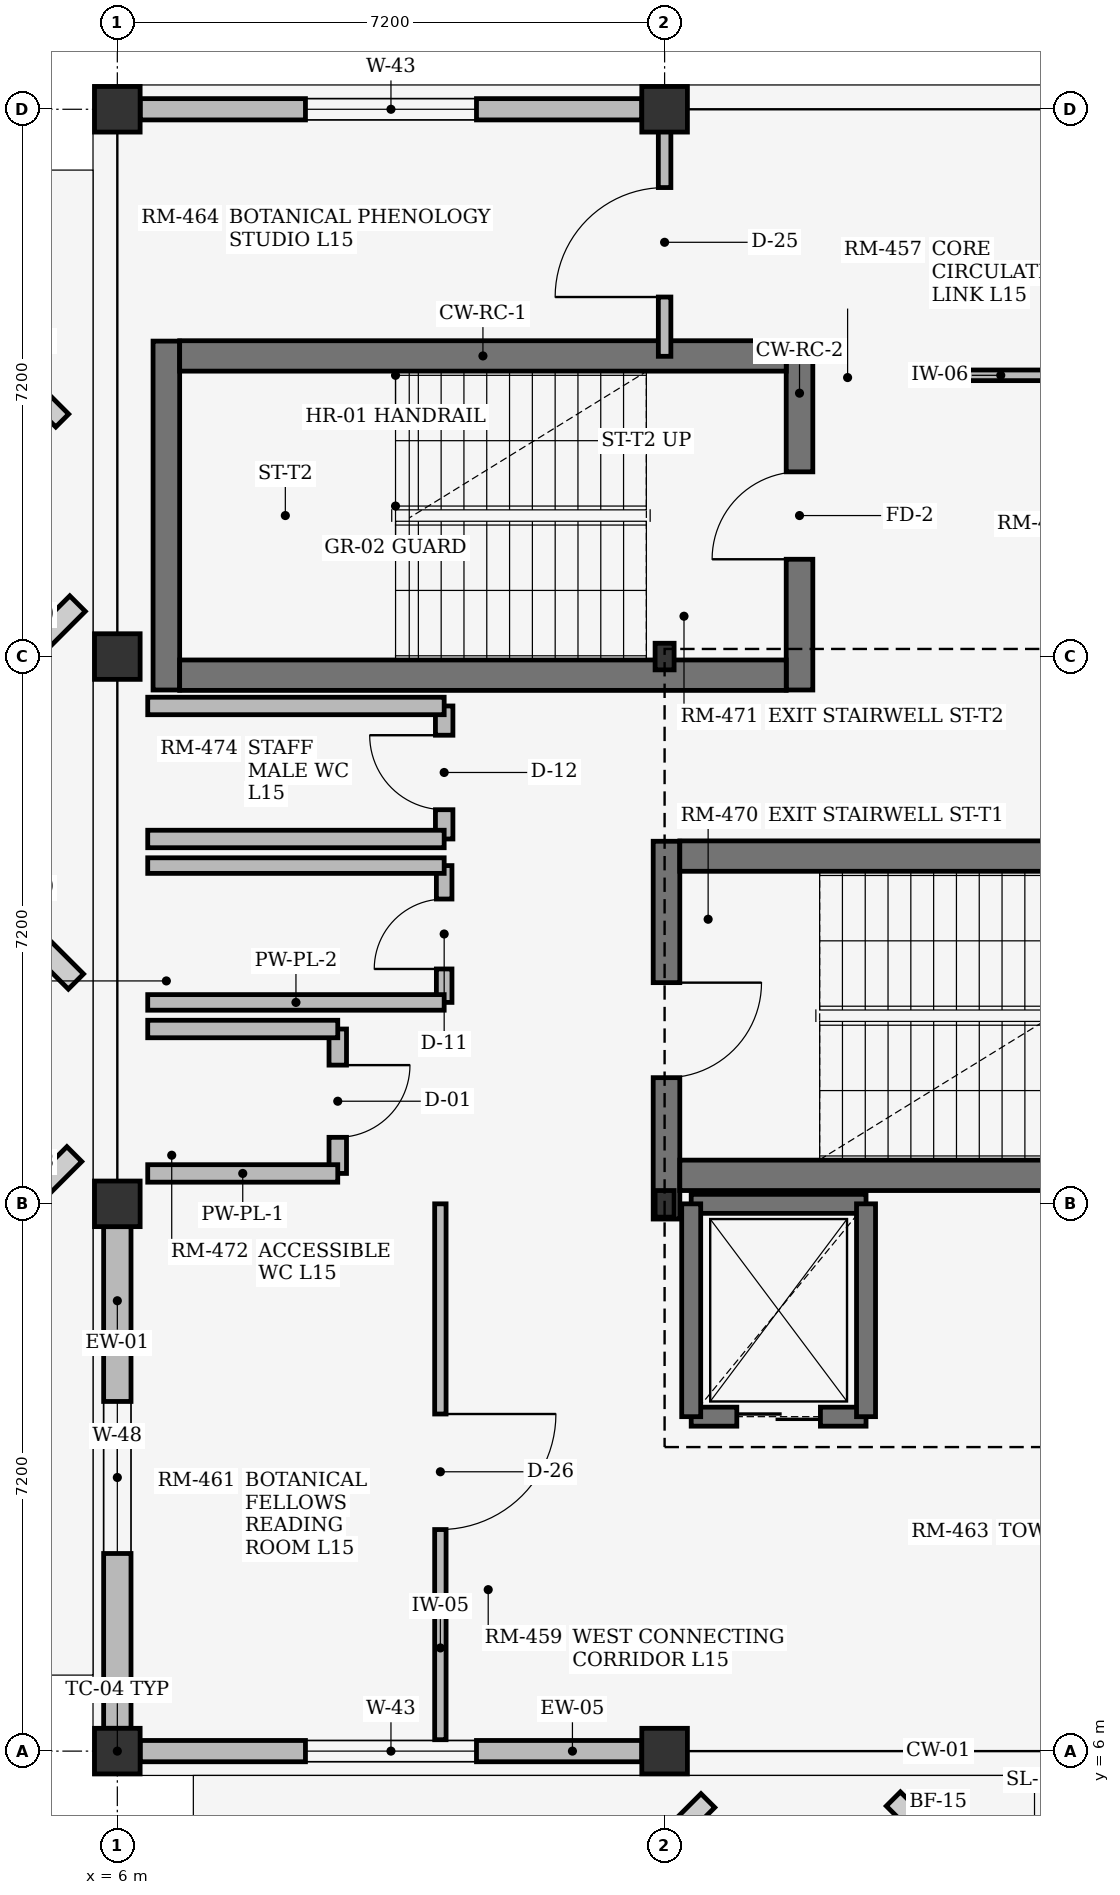
"""IFC4 building model, lengths in metres.
Left out: names, types, materials, properties, quantities, classifications, styles, units other than length and angle.
Written with IfcOpenShell. Run it as: python <this file> out.ifc"""

import sys

from ifc_helpers import new_model, si_unit, direction, frame, frame_2d, origin, origin_2d, place, context, subcontext, project, spatial, rectangle, i_section, extrude, element, fill, save


model = new_model("IFC4")
c1 = context("Model", 3, precision=1e-05, world=origin(), true_north=direction((0.0, 1.0)))
c2 = subcontext(c1, "Body", "Model", "MODEL_VIEW")
j1 = project(units=[si_unit("LENGTHUNIT", "METRE"), si_unit("PLANEANGLEUNIT", "RADIAN")], contexts=[c1])
p1 = place(None, origin())
s1 = spatial("IfcSite", under=j1, at=p1, CompositionType="ELEMENT")
p2 = place(p1, origin())
s2 = spatial("IfcBuilding", under=s1, at=p2, CompositionType="ELEMENT")
p3 = place(p2, frame((0.0, 0.0, 59.4)))
s3 = spatial("IfcBuildingStorey", under=s2, at=p3, CompositionType="ELEMENT", Elevation=59.4)
for number, where, z_axis, x_axis in (
    (1, (6.0, 6.0, 0.0), (0.0, 0.0, 1.0), (1.0, 0.0, 0.0)),
    (2, (6.0, 13.2, 0.0), (0.0, 0.0, 1.0), (1.0, 0.0, 0.0)),
    (3, (6.0, 20.4, 0.0), (0.0, 0.0, 1.0), (1.0, 0.0, 0.0)),
    (4, (6.0, 27.6, 0.0), (0.0, 0.0, 1.0), (1.0, 0.0, 0.0)),
    (5, (13.2, 6.0, 0.0), (0.0, 0.0, 1.0), (1.0, 0.0, 0.0)),
):
    element("IfcColumn", number, at=place(p3, frame(where, z_axis=z_axis, x_axis=x_axis)), inside=s3, PredefinedType="COLUMN", context=c2, shape_type="SweptSolid", body=[
        extrude(rectangle(XDim=0.6, YDim=0.6, at=origin_2d()), origin(), (0.0, 0.0, 1.0), 3.53),
    ])
for number, where, z_axis, x_axis in (
    (6, (13.2, 13.2, 0.0), (0.0, 0.0, 1.0), (1.0, 0.0, 0.0)),
    (7, (13.2, 20.4, 0.0), (0.0, 0.0, 1.0), (1.0, 0.0, 0.0)),
):
    element("IfcColumn", number, at=place(p3, frame(where, z_axis=z_axis, x_axis=x_axis)), inside=s3, PredefinedType="COLUMN", context=c2, shape_type="SweptSolid", body=[
        extrude(i_section(OverallWidth=0.25, OverallDepth=0.35, WebThickness=0.01, FlangeThickness=0.012, at=origin_2d()), origin(), (0.0, 0.0, 1.0), 3.53),
    ])
p4 = place(p3, frame((13.2, 27.6, 0.0), z_axis=(0.0, 0.0, 1.0), x_axis=(1.0, 0.0, 0.0)))
e8 = element("IfcColumn", 8, at=p4, inside=s3, PredefinedType="COLUMN", context=c2, shape_type="SweptSolid", body=[
    extrude(rectangle(XDim=0.6, YDim=0.6, at=origin_2d()), origin(), (0.0, 0.0, 1.0), 3.53),
])
p5 = place(p3, frame((6.3, 6.0, 0.0), z_axis=(0.0, 0.0, 1.0), x_axis=(1.0, 0.0, 0.0)))
e9 = element("IfcWall", 9, at=p5, inside=s3, PredefinedType="STANDARD", context=c2, shape_type="SweptSolid", body=[
    extrude(rectangle(XDim=6.6, YDim=0.28, at=frame_2d((3.3, 0.0))), origin(), (0.0, 0.0, 1.0), 3.11),
])
p6 = place(p5, frame((2.175, 0.0, 0.75)))
e10 = element("IfcOpeningElement", 10, at=p6, cuts=e9, PredefinedType="OPENING", context=c2, shape_type="SweptSolid", body=[
    extrude(rectangle(XDim=2.25, YDim=1.5, at=frame_2d((1.125, 0.75))), frame((0.0, 0.15, 0.0), z_axis=(0.0, -1.0, 0.0), x_axis=(1.0, 0.0, 0.0)), (0.0, 0.0, 1.0), 0.3),
])
p7 = place(p3, frame((6.3, 27.6, 0.0), z_axis=(0.0, 0.0, 1.0), x_axis=(1.0, 0.0, 0.0)))
e11 = element("IfcWall", 11, at=p7, inside=s3, PredefinedType="STANDARD", context=c2, shape_type="SweptSolid", body=[
    extrude(rectangle(XDim=6.6, YDim=0.28, at=frame_2d((3.3, 0.0))), origin(), (0.0, 0.0, 1.0), 3.11),
])
p8 = place(p7, frame((2.175, 0.0, 0.75)))
e12 = element("IfcOpeningElement", 12, at=p8, cuts=e11, PredefinedType="OPENING", context=c2, shape_type="SweptSolid", body=[
    extrude(rectangle(XDim=2.25, YDim=1.5, at=frame_2d((1.125, 0.75))), frame((0.0, 0.15, 0.0), z_axis=(0.0, -1.0, 0.0), x_axis=(1.0, 0.0, 0.0)), (0.0, 0.0, 1.0), 0.3),
])
p9 = place(p3, frame((6.0, 6.3, 0.0), z_axis=(0.0, 0.0, 1.0), x_axis=(0.0, 1.0, 0.0)))
e13 = element("IfcWall", 13, at=p9, inside=s3, PredefinedType="STANDARD", context=c2, shape_type="SweptSolid", body=[
    extrude(rectangle(XDim=6.6, YDim=0.36, at=frame_2d((3.3, 0.0))), origin(), (0.0, 0.0, 1.0), 3.11),
])
p10 = place(p9, frame((2.3, 0.0, 0.75)))
e14 = element("IfcOpeningElement", 14, at=p10, cuts=e13, PredefinedType="OPENING", context=c2, shape_type="SweptSolid", body=[
    extrude(rectangle(XDim=2.0, YDim=1.25, at=frame_2d((1.0, 0.625))), frame((0.0, 0.19, 0.0), z_axis=(0.0, -1.0, 0.0), x_axis=(1.0, 0.0, 0.0)), (0.0, 0.0, 1.0), 0.38),
])
p11 = place(p3, frame((13.225, 13.0, 0.0), z_axis=(0.0, 0.0, 1.0), x_axis=(0.0, 1.0, 0.0)))
e15 = element("IfcWall", 15, at=p11, inside=s3, PredefinedType="SHEAR", context=c2, shape_type="SweptSolid", body=[
    extrude(rectangle(XDim=4.97, YDim=0.35, at=frame_2d((2.485, 0.0))), origin(), (0.0, 0.0, 1.0), 3.53),
])
p12 = place(p11, frame((1.86, 0.0, 0.0)))
e16 = element("IfcOpeningElement", 16, at=p12, cuts=e15, PredefinedType="OPENING", context=c2, shape_type="SweptSolid", body=[
    extrude(rectangle(XDim=1.25, YDim=2.2, at=frame_2d((0.625, 1.1))), frame((0.0, 0.185, 0.0), z_axis=(0.0, -1.0, 0.0), x_axis=(1.0, 0.0, 0.0)), (0.0, 0.0, 1.0), 0.37),
])
for number, where, z_axis, x_axis in (
    (17, (13.4, 13.575, 0.0), (0.0, 0.0, 1.0), (1.0, 0.0, 0.0)),
    (18, (13.4, 17.775, 0.0), (0.0, 0.0, 1.0), (1.0, 0.0, 0.0)),
):
    element("IfcWall", number, at=place(p3, frame(where, z_axis=z_axis, x_axis=x_axis)), inside=s3, PredefinedType="SHEAR", context=c2, shape_type="SweptSolid", body=[
        extrude(rectangle(XDim=7.98, YDim=0.4, at=frame_2d((3.99, 0.0))), origin(), (0.0, 0.0, 1.0), 3.53),
    ])
p13 = place(p3, frame((14.975, 24.55, 0.0), z_axis=(0.0, 0.0, 1.0), x_axis=(0.0, -1.0, 0.0)))
e19 = element("IfcWall", 19, at=p13, inside=s3, PredefinedType="SHEAR", context=c2, shape_type="SweptSolid", body=[
    extrude(rectangle(XDim=4.59, YDim=0.35, at=frame_2d((2.295, 0.0))), origin(), (0.0, 0.0, 1.0), 3.53),
])
p14 = place(p13, frame((1.72, 0.0, 0.0)))
e20 = element("IfcOpeningElement", 20, at=p14, cuts=e19, PredefinedType="OPENING", context=c2, shape_type="SweptSolid", body=[
    extrude(rectangle(XDim=1.15, YDim=2.2, at=frame_2d((0.575, 1.1))), frame((0.0, 0.185, 0.0), z_axis=(0.0, -1.0, 0.0), x_axis=(1.0, 0.0, 0.0)), (0.0, 0.0, 1.0), 0.37),
])
p15 = place(p3, frame((6.645, 24.55, 0.0), z_axis=(0.0, 0.0, 1.0), x_axis=(0.0, -1.0, 0.0)))
e21 = element("IfcWall", 21, at=p15, inside=s3, PredefinedType="SHEAR", context=c2, shape_type="SweptSolid", body=[
    extrude(rectangle(XDim=4.59, YDim=0.35, at=frame_2d((2.295, 0.0))), origin(), (0.0, 0.0, 1.0), 3.53),
])
for number, where, z_axis, x_axis in (
    (22, (14.8, 24.355, 0.0), (0.0, 0.0, 1.0), (-1.0, 0.0, 0.0)),
    (23, (14.8, 20.155, 0.0), (0.0, 0.0, 1.0), (-1.0, 0.0, 0.0)),
):
    element("IfcWall", number, at=place(p3, frame(where, z_axis=z_axis, x_axis=x_axis)), inside=s3, PredefinedType="SHEAR", context=c2, shape_type="SweptSolid", body=[
        extrude(rectangle(XDim=7.98, YDim=0.4, at=frame_2d((3.99, 0.0))), origin(), (0.0, 0.0, 1.0), 3.53),
    ])
p16 = place(p3, frame((13.55, 10.4, 0.0), z_axis=(0.0, 0.0, 1.0), x_axis=(1.0, 0.0, 0.0)))
e24 = element("IfcWall", 24, at=p16, inside=s3, PredefinedType="SHEAR", context=c2, shape_type="SweptSolid", body=[
    extrude(rectangle(XDim=2.3, YDim=0.25, at=frame_2d((1.15, 0.0))), origin(), (0.0, 0.0, 1.0), 3.53),
])
p17 = place(p16, frame((0.6, 0.0, 0.0)))
e25 = element("IfcOpeningElement", 25, at=p17, cuts=e24, PredefinedType="OPENING", context=c2, shape_type="SweptSolid", body=[
    extrude(rectangle(XDim=1.1, YDim=2.2, at=frame_2d((0.55, 1.1))), frame((0.0, 0.135, 0.0), z_axis=(0.0, -1.0, 0.0), x_axis=(1.0, 0.0, 0.0)), (0.0, 0.0, 1.0), 0.27),
])
p18 = place(p3, frame((13.55, 13.2, 0.0), z_axis=(0.0, 0.0, 1.0), x_axis=(1.0, 0.0, 0.0)))
e26 = element("IfcWall", 26, at=p18, inside=s3, PredefinedType="SHEAR", context=c2, shape_type="SweptSolid", body=[
    extrude(rectangle(XDim=2.3, YDim=0.25, at=frame_2d((1.15, 0.0))), origin(), (0.0, 0.0, 1.0), 3.53),
])
for number, where, z_axis, x_axis in (
    (27, (13.55, 10.4, 0.0), (0.0, 0.0, 1.0), (0.0, 1.0, 0.0)),
    (28, (15.85, 10.4, 0.0), (0.0, 0.0, 1.0), (0.0, 1.0, 0.0)),
):
    element("IfcWall", number, at=place(p3, frame(where, z_axis=z_axis, x_axis=x_axis)), inside=s3, PredefinedType="SHEAR", context=c2, shape_type="SweptSolid", body=[
        extrude(rectangle(XDim=2.8, YDim=0.25, at=frame_2d((1.4, 0.0))), origin(), (0.0, 0.0, 1.0), 3.53),
    ])
p19 = place(p3, frame((8.9, 13.6, 0.0), z_axis=(0.0, 0.0, 1.0), x_axis=(0.0, 1.0, 0.0)))
e29 = element("IfcWall", 29, at=p19, inside=s3, PredefinedType="PLUMBINGWALL", context=c2, shape_type="SweptSolid", body=[
    extrude(rectangle(XDim=1.9, YDim=0.23, at=frame_2d((0.95, 0.0))), origin(), (0.0, 0.0, 1.0), 3.51),
])
p20 = place(p19, frame((0.475, 0.0, 0.0)))
e30 = element("IfcOpeningElement", 30, at=p20, cuts=e29, PredefinedType="OPENING", context=c2, shape_type="SweptSolid", body=[
    extrude(rectangle(XDim=0.95, YDim=2.15, at=frame_2d((0.475, 1.075))), frame((0.0, 0.125, 0.0), z_axis=(0.0, -1.0, 0.0), x_axis=(1.0, 0.0, 0.0)), (0.0, 0.0, 1.0), 0.25),
])
for number, where, z_axis, x_axis in (
    (31, (6.4, 13.6, 0.0), (0.0, 0.0, 1.0), (1.0, 0.0, 0.0)),
    (32, (6.4, 15.5, 0.0), (0.0, 0.0, 1.0), (1.0, 0.0, 0.0)),
):
    element("IfcWall", number, at=place(p3, frame(where, z_axis=z_axis, x_axis=x_axis)), inside=s3, PredefinedType="PLUMBINGWALL", context=c2, shape_type="SweptSolid", body=[
        extrude(rectangle(XDim=2.5, YDim=0.23, at=frame_2d((1.25, 0.0))), origin(), (0.0, 0.0, 1.0), 3.51),
    ])
p21 = place(p3, frame((10.3, 15.85, 0.0), z_axis=(0.0, 0.0, 1.0), x_axis=(0.0, 1.0, 0.0)))
e33 = element("IfcWall", 33, at=p21, inside=s3, PredefinedType="PLUMBINGWALL", context=c2, shape_type="SweptSolid", body=[
    extrude(rectangle(XDim=1.8, YDim=0.205, at=frame_2d((0.9, 0.0))), origin(), (0.0, 0.0, 1.0), 3.51),
])
p22 = place(p21, frame((0.44, 0.0, 0.0)))
e34 = element("IfcOpeningElement", 34, at=p22, cuts=e33, PredefinedType="OPENING", context=c2, shape_type="SweptSolid", body=[
    extrude(rectangle(XDim=0.92, YDim=2.1, at=frame_2d((0.46, 1.05))), frame((0.0, 0.113, 0.0), z_axis=(0.0, -1.0, 0.0), x_axis=(1.0, 0.0, 0.0)), (0.0, 0.0, 1.0), 0.225),
])
for number, where, z_axis, x_axis in (
    (35, (6.4, 15.85, 0.0), (0.0, 0.0, 1.0), (1.0, 0.0, 0.0)),
    (36, (6.4, 17.65, 0.0), (0.0, 0.0, 1.0), (1.0, 0.0, 0.0)),
):
    element("IfcWall", number, at=place(p3, frame(where, z_axis=z_axis, x_axis=x_axis)), inside=s3, PredefinedType="PLUMBINGWALL", context=c2, shape_type="SweptSolid", body=[
        extrude(rectangle(XDim=3.9, YDim=0.205, at=frame_2d((1.95, 0.0))), origin(), (0.0, 0.0, 1.0), 3.51),
    ])
p23 = place(p3, frame((10.3, 18.0, 0.0), z_axis=(0.0, 0.0, 1.0), x_axis=(0.0, 1.0, 0.0)))
e37 = element("IfcWall", 37, at=p23, inside=s3, PredefinedType="PLUMBINGWALL", context=c2, shape_type="SweptSolid", body=[
    extrude(rectangle(XDim=1.75, YDim=0.23, at=frame_2d((0.875, 0.0))), origin(), (0.0, 0.0, 1.0), 3.51),
])
p24 = place(p23, frame((0.385, 0.0, 0.0)))
e38 = element("IfcOpeningElement", 38, at=p24, cuts=e37, PredefinedType="OPENING", context=c2, shape_type="SweptSolid", body=[
    extrude(rectangle(XDim=0.98, YDim=2.1, at=frame_2d((0.49, 1.05))), frame((0.0, 0.125, 0.0), z_axis=(0.0, -1.0, 0.0), x_axis=(1.0, 0.0, 0.0)), (0.0, 0.0, 1.0), 0.25),
])
for number, where, z_axis, x_axis in (
    (39, (6.4, 18.0, 0.0), (0.0, 0.0, 1.0), (1.0, 0.0, 0.0)),
    (40, (6.4, 19.75, 0.0), (0.0, 0.0, 1.0), (1.0, 0.0, 0.0)),
):
    element("IfcWall", number, at=place(p3, frame(where, z_axis=z_axis, x_axis=x_axis)), inside=s3, PredefinedType="PLUMBINGWALL", context=c2, shape_type="SweptSolid", body=[
        extrude(rectangle(XDim=3.9, YDim=0.23, at=frame_2d((1.95, 0.0))), origin(), (0.0, 0.0, 1.0), 3.51),
    ])
p25 = place(p3, frame((13.2, 24.35, 0.0), z_axis=(0.0, 0.0, 1.0), x_axis=(0.0, 1.0, 0.0)))
e41 = element("IfcWall", 41, at=p25, inside=s3, PredefinedType="PARTITIONING", context=c2, shape_type="SweptSolid", body=[
    extrude(rectangle(XDim=3.0, YDim=0.165, at=frame_2d((1.5, 0.0))), origin(), (0.0, 0.0, 1.0), 3.12),
])
p26 = place(p25, frame((0.78, 0.0, 0.0)))
e42 = element("IfcOpeningElement", 42, at=p26, cuts=e41, PredefinedType="OPENING", context=c2, shape_type="SweptSolid", body=[
    extrude(rectangle(XDim=1.44, YDim=2.24, at=frame_2d((0.72, 1.12))), frame((0.0, 0.093, 0.0), z_axis=(0.0, -1.0, 0.0), x_axis=(1.0, 0.0, 0.0)), (0.0, 0.0, 1.0), 0.185),
])
p27 = place(p3, frame((10.25, 6.15, 0.0), z_axis=(0.0, 0.0, 1.0), x_axis=(0.0, 1.0, 0.0)))
e43 = element("IfcWall", 43, at=p27, inside=s3, PredefinedType="PARTITIONING", context=c2, shape_type="SweptSolid", body=[
    extrude(rectangle(XDim=7.05, YDim=0.15, at=frame_2d((3.525, 0.0))), origin(), (0.0, 0.0, 1.0), 3.51),
])
p28 = place(p27, frame((2.765, 0.0, 0.0)))
e44 = element("IfcOpeningElement", 44, at=p28, cuts=e43, PredefinedType="OPENING", context=c2, shape_type="SweptSolid", body=[
    extrude(rectangle(XDim=1.52, YDim=2.26, at=frame_2d((0.76, 1.13))), frame((0.0, 0.085, 0.0), z_axis=(0.0, -1.0, 0.0), x_axis=(1.0, 0.0, 0.0)), (0.0, 0.0, 1.0), 0.17),
])
p29 = place(p3, frame((17.17, 24.1, 0.0), z_axis=(0.0, 0.0, 1.0), x_axis=(1.0, 0.0, 0.0)))
e45 = element("IfcWall", 45, at=p29, inside=s3, PredefinedType="PARTITIONING", context=c2, shape_type="SweptSolid", body=[
    extrude(rectangle(XDim=4.13, YDim=0.14, at=frame_2d((2.065, 0.0))), origin(), (0.0, 0.0, 1.0), 3.51),
])
p30 = place(p29, frame((1.255, 0.0, 0.0)))
e46 = element("IfcOpeningElement", 46, at=p30, cuts=e45, PredefinedType="OPENING", context=c2, shape_type="SweptSolid", body=[
    extrude(rectangle(XDim=1.62, YDim=2.28, at=frame_2d((0.81, 1.14))), frame((0.0, 0.08, 0.0), z_axis=(0.0, -1.0, 0.0), x_axis=(1.0, 0.0, 0.0)), (0.0, 0.0, 1.0), 0.16),
])
p31 = place(p6, origin())
e47 = element("IfcWindow", 47, at=p31, inside=s3, PartitioningType="SINGLE_PANEL", PredefinedType="WINDOW", context=c2, shape_type="SweptSolid", body=[
    extrude(rectangle(XDim=2.25, YDim=1.5, at=frame_2d((1.125, 0.75))), frame((0.0, 0.03, 0.0), z_axis=(0.0, -1.0, 0.0), x_axis=(1.0, 0.0, 0.0)), (0.0, 0.0, 1.0), 0.06),
])
fill(e10, e47)
p32 = place(p8, origin())
e48 = element("IfcWindow", 48, at=p32, inside=s3, PartitioningType="SINGLE_PANEL", PredefinedType="WINDOW", context=c2, shape_type="SweptSolid", body=[
    extrude(rectangle(XDim=2.25, YDim=1.5, at=frame_2d((1.125, 0.75))), frame((0.0, 0.03, 0.0), z_axis=(0.0, -1.0, 0.0), x_axis=(1.0, 0.0, 0.0)), (0.0, 0.0, 1.0), 0.06),
])
fill(e12, e48)
p33 = place(p10, origin())
e49 = element("IfcWindow", 49, at=p33, inside=s3, PartitioningType="SINGLE_PANEL", PredefinedType="WINDOW", context=c2, shape_type="SweptSolid", body=[
    extrude(rectangle(XDim=2.0, YDim=1.25, at=frame_2d((1.0, 0.625))), frame((0.0, 0.03, 0.0), z_axis=(0.0, -1.0, 0.0), x_axis=(1.0, 0.0, 0.0)), (0.0, 0.0, 1.0), 0.06),
])
fill(e14, e49)
p34 = place(p12, origin())
e50 = element("IfcDoor", 50, at=p34, inside=s3, OperationType="SINGLE_SWING_RIGHT", PredefinedType="DOOR", context=c2, shape_type="SweptSolid", body=[
    extrude(rectangle(XDim=1.25, YDim=2.2, at=frame_2d((0.625, 1.1))), frame((0.0, 0.025, 0.0), z_axis=(0.0, -1.0, 0.0), x_axis=(1.0, 0.0, 0.0)), (0.0, 0.0, 1.0), 0.05),
])
fill(e16, e50)
p35 = place(p14, origin())
e51 = element("IfcDoor", 51, at=p35, inside=s3, OperationType="SINGLE_SWING_RIGHT", PredefinedType="DOOR", context=c2, shape_type="SweptSolid", body=[
    extrude(rectangle(XDim=1.15, YDim=2.2, at=frame_2d((0.575, 1.1))), frame((0.0, 0.025, 0.0), z_axis=(0.0, -1.0, 0.0), x_axis=(1.0, 0.0, 0.0)), (0.0, 0.0, 1.0), 0.05),
])
fill(e20, e51)
p36 = place(p17, origin())
e52 = element("IfcDoor", 52, at=p36, inside=s3, OperationType="DOUBLE_DOOR_SLIDING", PredefinedType="DOOR", context=c2, shape_type="SweptSolid", body=[
    extrude(rectangle(XDim=1.1, YDim=2.2, at=frame_2d((0.55, 1.1))), frame((0.0, 0.025, 0.0), z_axis=(0.0, -1.0, 0.0), x_axis=(1.0, 0.0, 0.0)), (0.0, 0.0, 1.0), 0.05),
])
fill(e25, e52)
p37 = place(p20, origin())
e53 = element("IfcDoor", 53, at=p37, inside=s3, OperationType="SINGLE_SWING_RIGHT", PredefinedType="DOOR", context=c2, shape_type="SweptSolid", body=[
    extrude(rectangle(XDim=0.95, YDim=2.15, at=frame_2d((0.475, 1.075))), frame((0.0, 0.025, 0.0), z_axis=(0.0, -1.0, 0.0), x_axis=(1.0, 0.0, 0.0)), (0.0, 0.0, 1.0), 0.05),
])
fill(e30, e53)
p38 = place(p22, origin())
e54 = element("IfcDoor", 54, at=p38, inside=s3, OperationType="SINGLE_SWING_LEFT", PredefinedType="DOOR", context=c2, shape_type="SweptSolid", body=[
    extrude(rectangle(XDim=0.92, YDim=2.1, at=frame_2d((0.46, 1.05))), frame((0.0, 0.025, 0.0), z_axis=(0.0, -1.0, 0.0), x_axis=(1.0, 0.0, 0.0)), (0.0, 0.0, 1.0), 0.05),
])
fill(e34, e54)
p39 = place(p24, frame((0.98, 0.0, 0.0), z_axis=(0.0, 0.0, 1.0), x_axis=(-1.0, 0.0, 0.0)))
e55 = element("IfcDoor", 55, at=p39, inside=s3, OperationType="SINGLE_SWING_RIGHT", PredefinedType="DOOR", context=c2, shape_type="SweptSolid", body=[
    extrude(rectangle(XDim=0.98, YDim=2.1, at=frame_2d((0.49, 1.05))), frame((0.0, 0.025, 0.0), z_axis=(0.0, -1.0, 0.0), x_axis=(1.0, 0.0, 0.0)), (0.0, 0.0, 1.0), 0.05),
])
fill(e38, e55)
p40 = place(p26, origin())
e56 = element("IfcDoor", 56, at=p40, inside=s3, OperationType="SINGLE_SWING_LEFT", PredefinedType="DOOR", context=c2, shape_type="SweptSolid", body=[
    extrude(rectangle(XDim=1.44, YDim=2.24, at=frame_2d((0.72, 1.12))), frame((0.0, 0.025, 0.0), z_axis=(0.0, -1.0, 0.0), x_axis=(1.0, 0.0, 0.0)), (0.0, 0.0, 1.0), 0.05),
])
fill(e42, e56)
p41 = place(p28, origin())
e57 = element("IfcDoor", 57, at=p41, inside=s3, OperationType="SINGLE_SWING_RIGHT", PredefinedType="DOOR", context=c2, shape_type="SweptSolid", body=[
    extrude(rectangle(XDim=1.52, YDim=2.26, at=frame_2d((0.76, 1.13))), frame((0.0, 0.025, 0.0), z_axis=(0.0, -1.0, 0.0), x_axis=(1.0, 0.0, 0.0)), (0.0, 0.0, 1.0), 0.05),
])
fill(e44, e57)
save(model, sys.argv[1])
